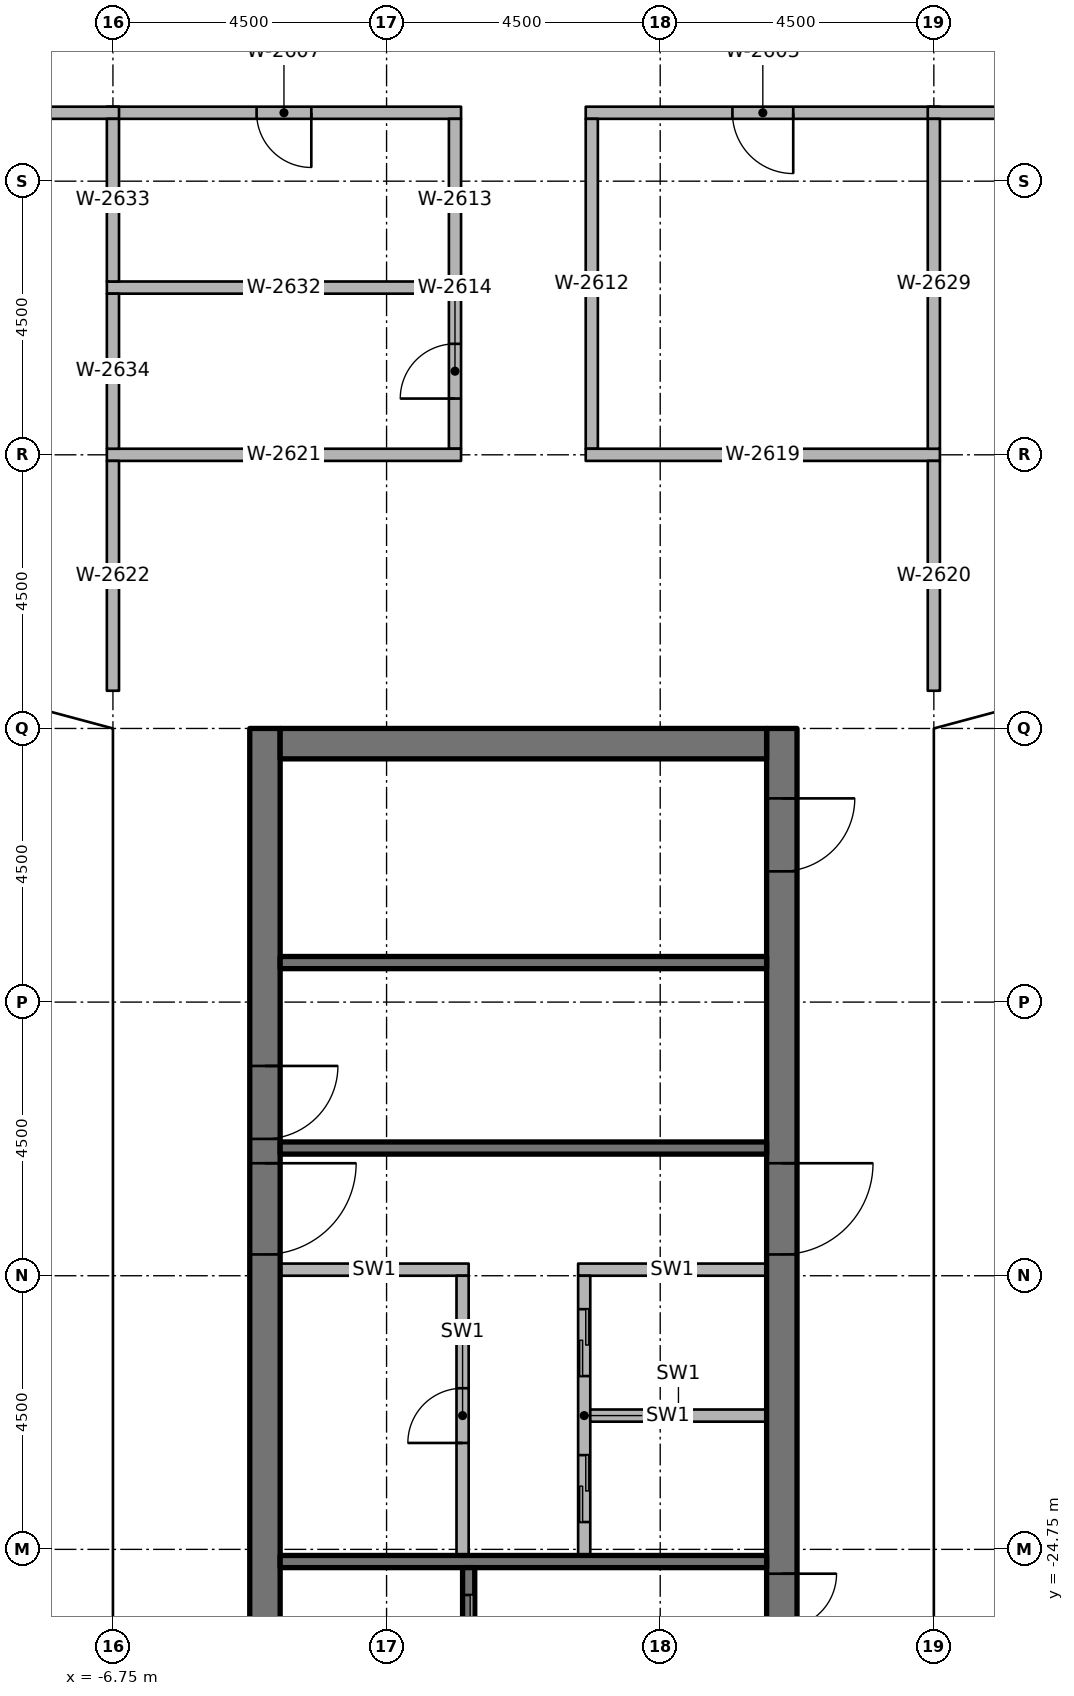
"""IFC4 building model, lengths in metres.
Left out: names, types, materials, properties, quantities, classifications, styles, units other than length and angle.
Written with IfcOpenShell. Run it as: python <this file> out.ifc"""

import sys

from ifc_helpers import new_model, si_unit, direction, frame, frame_2d, origin, origin_2d, place, context, subcontext, project, spatial, rectangle, extrude, element, fill, save


model = new_model("IFC4")
c1 = context("Model", 3, precision=1e-05, world=origin(), true_north=direction((0.0, 1.0)))
c2 = subcontext(c1, "Body", "Model", "MODEL_VIEW")
j1 = project(units=[si_unit("LENGTHUNIT", "METRE"), si_unit("PLANEANGLEUNIT", "RADIAN")], contexts=[c1])
p1 = place(None, origin())
s1 = spatial("IfcSite", under=j1, at=p1, CompositionType="ELEMENT")
p2 = place(p1, origin())
s2 = spatial("IfcBuilding", under=s1, at=p2, CompositionType="ELEMENT")
p3 = place(p2, frame((0.0, 0.0, 249.8)))
s3 = spatial("IfcBuildingStorey", under=s2, at=p3, CompositionType="ELEMENT", Elevation=249.8)
for number, where, z_axis, x_axis in (
    (1, (-6.25, -24.65, 0.0), (0.0, 0.0, 1.0), (1.0, 0.0, 0.0)),
    (2, (-6.25, -20.25, 0.0), (0.0, 0.0, 1.0), (1.0, 0.0, 0.0)),
    (3, (-6.25, -15.75, 0.0), (0.0, 0.0, 1.0), (1.0, 0.0, 0.0)),
    (4, (-6.25, -10.75, 0.0), (0.0, 0.0, 1.0), (1.0, 0.0, 0.0)),
    (5, (-6.25, -6.25, 0.0), (0.0, 0.0, 1.0), (1.0, 0.0, 0.0)),
    (6, (6.25, -24.65, 0.0), (0.0, 0.0, 1.0), (1.0, 0.0, 0.0)),
    (7, (6.25, -20.25, 0.0), (0.0, 0.0, 1.0), (1.0, 0.0, 0.0)),
    (8, (6.25, -15.75, 0.0), (0.0, 0.0, 1.0), (1.0, 0.0, 0.0)),
    (9, (6.25, -10.75, 0.0), (0.0, 0.0, 1.0), (1.0, 0.0, 0.0)),
    (10, (6.25, -6.25, 0.0), (0.0, 0.0, 1.0), (1.0, 0.0, 0.0)),
):
    element("IfcColumn", number, at=place(p3, frame(where, z_axis=z_axis, x_axis=x_axis)), inside=s3, PredefinedType="COLUMN", context=c2, shape_type="SweptSolid", body=[
        extrude(rectangle(XDim=0.6, YDim=0.6, at=origin_2d()), origin(), (0.0, 0.0, 1.0), 3.65),
    ])
p4 = place(p3, frame((-4.25, -11.25, 0.0), z_axis=(0.0, 0.0, 1.0), x_axis=(0.0, -1.0, 0.0)))
e11 = element("IfcWall", 11, at=p4, inside=s3, PredefinedType="SHEAR", context=c2, shape_type="SweptSolid", body=[
    extrude(rectangle(XDim=15.0, YDim=0.5, at=frame_2d((7.5, 0.0))), origin(), (0.0, 0.0, 1.0), 3.8),
])
p5 = place(p4, frame((7.15, 0.0, 0.0)))
e12 = element("IfcOpeningElement", 12, at=p5, cuts=e11, PredefinedType="OPENING", context=c2, shape_type="SweptSolid", body=[
    extrude(rectangle(XDim=1.5, YDim=2.3, at=frame_2d((0.75, 1.15))), frame((0.0, 0.26, 0.0), z_axis=(0.0, -1.0, 0.0), x_axis=(1.0, 0.0, 0.0)), (0.0, 0.0, 1.0), 0.52),
])
p6 = place(p4, frame((5.55, 0.0, 0.0)))
e13 = element("IfcOpeningElement", 13, at=p6, cuts=e11, PredefinedType="OPENING", context=c2, shape_type="SweptSolid", body=[
    extrude(rectangle(XDim=1.2, YDim=2.1, at=frame_2d((0.6, 1.05))), frame((0.0, 0.26, 0.0), z_axis=(0.0, -1.0, 0.0), x_axis=(1.0, 0.0, 0.0)), (0.0, 0.0, 1.0), 0.52),
])
p7 = place(p3, frame((4.25, -11.25, 0.0), z_axis=(0.0, 0.0, 1.0), x_axis=(0.0, -1.0, 0.0)))
e14 = element("IfcWall", 14, at=p7, inside=s3, PredefinedType="SHEAR", context=c2, shape_type="SweptSolid", body=[
    extrude(rectangle(XDim=15.0, YDim=0.5, at=frame_2d((7.5, 0.0))), origin(), (0.0, 0.0, 1.0), 3.8),
])
p8 = place(p7, frame((7.15, 0.0, 0.0)))
e15 = element("IfcOpeningElement", 15, at=p8, cuts=e14, PredefinedType="OPENING", context=c2, shape_type="SweptSolid", body=[
    extrude(rectangle(XDim=1.5, YDim=2.3, at=frame_2d((0.75, 1.15))), frame((0.0, 0.26, 0.0), z_axis=(0.0, -1.0, 0.0), x_axis=(1.0, 0.0, 0.0)), (0.0, 0.0, 1.0), 0.52),
])
p9 = place(p7, frame((13.9, 0.0, 0.0)))
e16 = element("IfcOpeningElement", 16, at=p9, cuts=e14, PredefinedType="OPENING", context=c2, shape_type="SweptSolid", body=[
    extrude(rectangle(XDim=0.9, YDim=2.1, at=frame_2d((0.45, 1.05))), frame((0.0, 0.26, 0.0), z_axis=(0.0, -1.0, 0.0), x_axis=(1.0, 0.0, 0.0)), (0.0, 0.0, 1.0), 0.52),
])
p10 = place(p7, frame((1.15, 0.0, 0.0)))
e17 = element("IfcOpeningElement", 17, at=p10, cuts=e14, PredefinedType="OPENING", context=c2, shape_type="SweptSolid", body=[
    extrude(rectangle(XDim=1.2, YDim=2.1, at=frame_2d((0.6, 1.05))), frame((0.0, 0.26, 0.0), z_axis=(0.0, -1.0, 0.0), x_axis=(1.0, 0.0, 0.0)), (0.0, 0.0, 1.0), 0.52),
])
p11 = place(p3, frame((-4.0, -11.5, 0.0), z_axis=(0.0, 0.0, 1.0), x_axis=(1.0, 0.0, 0.0)))
e18 = element("IfcWall", 18, at=p11, inside=s3, PredefinedType="SHEAR", context=c2, shape_type="SweptSolid", body=[
    extrude(rectangle(XDim=8.0, YDim=0.5, at=frame_2d((4.0, 0.0))), origin(), (0.0, 0.0, 1.0), 3.8),
])
p12 = place(p3, frame((4.0, -24.95, 0.0), z_axis=(0.0, 0.0, 1.0), x_axis=(-1.0, 0.0, 0.0)))
e19 = element("IfcWall", 19, at=p12, inside=s3, PredefinedType="SHEAR", context=c2, shape_type="SweptSolid", body=[
    extrude(rectangle(XDim=8.0, YDim=0.2, at=frame_2d((4.0, 0.0))), origin(), (0.0, 0.0, 1.0), 3.65),
])
p13 = place(p3, frame((-0.9, -27.3, 0.0), z_axis=(0.0, 0.0, 1.0), x_axis=(0.0, 1.0, 0.0)))
e20 = element("IfcWall", 20, at=p13, inside=s3, PredefinedType="SHEAR", context=c2, shape_type="SweptSolid", body=[
    extrude(rectangle(XDim=2.25, YDim=0.2, at=frame_2d((1.125, 0.0))), origin(), (0.0, 0.0, 1.0), 3.65),
])
p14 = place(p13, frame((0.7, 0.0, 0.0)))
e21 = element("IfcOpeningElement", 21, at=p14, cuts=e20, PredefinedType="OPENING", context=c2, shape_type="SweptSolid", body=[
    extrude(rectangle(XDim=1.1, YDim=2.3, at=frame_2d((0.55, 1.15))), frame((0.0, 0.11, 0.0), z_axis=(0.0, -1.0, 0.0), x_axis=(1.0, 0.0, 0.0)), (0.0, 0.0, 1.0), 0.22),
])
for number, where, z_axis, x_axis in (
    (22, (4.0, -18.15, 0.0), (0.0, 0.0, 1.0), (-1.0, 0.0, 0.0)),
    (23, (4.0, -15.1, 0.0), (0.0, 0.0, 1.0), (-1.0, 0.0, 0.0)),
):
    element("IfcWall", number, at=place(p3, frame(where, z_axis=z_axis, x_axis=x_axis)), inside=s3, PredefinedType="SHEAR", context=c2, shape_type="SweptSolid", body=[
        extrude(rectangle(XDim=8.0, YDim=0.2, at=frame_2d((4.0, 0.0))), origin(), (0.0, 0.0, 1.0), 3.65),
    ])
p15 = place(p3, frame((4.0, -20.15, 0.0), z_axis=(0.0, 0.0, 1.0), x_axis=(-1.0, 0.0, 0.0)))
e24 = element("IfcWall", 24, at=p15, inside=s3, PredefinedType="PARTITIONING", context=c2, shape_type="SweptSolid", body=[
    extrude(rectangle(XDim=3.1, YDim=0.2, at=frame_2d((1.55, 0.0))), origin(), (0.0, 0.0, 1.0), 3.65),
])
p16 = place(p3, frame((1.0, -24.85, 0.0), z_axis=(0.0, 0.0, 1.0), x_axis=(0.0, 1.0, 0.0)))
e25 = element("IfcWall", 25, at=p16, inside=s3, PredefinedType="PARTITIONING", context=c2, shape_type="SweptSolid", body=[
    extrude(rectangle(XDim=4.6, YDim=0.2, at=frame_2d((2.3, 0.0))), origin(), (0.0, 0.0, 1.0), 3.65),
])
p17 = place(p16, frame((0.55, 0.0, 0.0)))
e26 = element("IfcOpeningElement", 26, at=p17, cuts=e25, PredefinedType="OPENING", context=c2, shape_type="SweptSolid", body=[
    extrude(rectangle(XDim=1.1, YDim=2.3, at=frame_2d((0.55, 1.15))), frame((0.0, 0.11, 0.0), z_axis=(0.0, -1.0, 0.0), x_axis=(1.0, 0.0, 0.0)), (0.0, 0.0, 1.0), 0.22),
])
p18 = place(p16, frame((2.95, 0.0, 0.0)))
e27 = element("IfcOpeningElement", 27, at=p18, cuts=e25, PredefinedType="OPENING", context=c2, shape_type="SweptSolid", body=[
    extrude(rectangle(XDim=1.1, YDim=2.3, at=frame_2d((0.55, 1.15))), frame((0.0, 0.11, 0.0), z_axis=(0.0, -1.0, 0.0), x_axis=(1.0, 0.0, 0.0)), (0.0, 0.0, 1.0), 0.22),
])
p19 = place(p3, frame((-0.9, -20.15, 0.0), z_axis=(0.0, 0.0, 1.0), x_axis=(-1.0, 0.0, 0.0)))
e28 = element("IfcWall", 28, at=p19, inside=s3, PredefinedType="PARTITIONING", context=c2, shape_type="SweptSolid", body=[
    extrude(rectangle(XDim=3.1, YDim=0.2, at=frame_2d((1.55, 0.0))), origin(), (0.0, 0.0, 1.0), 3.65),
])
p20 = place(p3, frame((-1.0, -24.85, 0.0), z_axis=(0.0, 0.0, 1.0), x_axis=(0.0, 1.0, 0.0)))
e29 = element("IfcWall", 29, at=p20, inside=s3, PredefinedType="PARTITIONING", context=c2, shape_type="SweptSolid", body=[
    extrude(rectangle(XDim=4.6, YDim=0.2, at=frame_2d((2.3, 0.0))), origin(), (0.0, 0.0, 1.0), 3.65),
])
p21 = place(p20, frame((1.85, 0.0, 0.0)))
e30 = element("IfcOpeningElement", 30, at=p21, cuts=e29, PredefinedType="OPENING", context=c2, shape_type="SweptSolid", body=[
    extrude(rectangle(XDim=0.9, YDim=2.1, at=frame_2d((0.45, 1.05))), frame((0.0, 0.11, 0.0), z_axis=(0.0, -1.0, 0.0), x_axis=(1.0, 0.0, 0.0)), (0.0, 0.0, 1.0), 0.22),
])
p22 = place(p3, frame((4.0, -22.55, 0.0), z_axis=(0.0, 0.0, 1.0), x_axis=(-1.0, 0.0, 0.0)))
e31 = element("IfcWall", 31, at=p22, inside=s3, PredefinedType="PARTITIONING", context=c2, shape_type="SweptSolid", body=[
    extrude(rectangle(XDim=2.9, YDim=0.2, at=frame_2d((1.45, 0.0))), origin(), (0.0, 0.0, 1.0), 3.65),
])
p23 = place(p3, frame((6.85, -1.125, 0.0), z_axis=(0.0, 0.0, 1.0), x_axis=(-1.0, 0.0, 0.0)))
e32 = element("IfcWall", 32, at=p23, inside=s3, PredefinedType="PARTITIONING", context=c2, shape_type="SweptSolid", body=[
    extrude(rectangle(XDim=5.825, YDim=0.2, at=frame_2d((2.913, 0.0))), origin(), (0.0, 0.0, 1.0), 2.75),
])
p24 = place(p23, frame((2.413, 0.0, 0.0)))
e33 = element("IfcOpeningElement", 33, at=p24, cuts=e32, PredefinedType="OPENING", context=c2, shape_type="SweptSolid", body=[
    extrude(rectangle(XDim=1.0, YDim=2.1, at=frame_2d((0.5, 1.05))), frame((0.0, 0.11, 0.0), z_axis=(0.0, -1.0, 0.0), x_axis=(1.0, 0.0, 0.0)), (0.0, 0.0, 1.0), 0.22),
])
p25 = place(p3, frame((11.35, -1.125, 0.0), z_axis=(0.0, 0.0, 1.0), x_axis=(-1.0, 0.0, 0.0)))
e34 = element("IfcWall", 34, at=p25, inside=s3, PredefinedType="PARTITIONING", context=c2, shape_type="SweptSolid", body=[
    extrude(rectangle(XDim=4.7, YDim=0.2, at=frame_2d((2.35, 0.0))), origin(), (0.0, 0.0, 1.0), 2.75),
])
p26 = place(p25, frame((1.85, 0.0, 0.0)))
e35 = element("IfcOpeningElement", 35, at=p26, cuts=e34, PredefinedType="OPENING", context=c2, shape_type="SweptSolid", body=[
    extrude(rectangle(XDim=1.0, YDim=2.1, at=frame_2d((0.5, 1.05))), frame((0.0, 0.11, 0.0), z_axis=(0.0, -1.0, 0.0), x_axis=(1.0, 0.0, 0.0)), (0.0, 0.0, 1.0), 0.22),
])
p27 = place(p3, frame((-1.025, -1.125, 0.0), z_axis=(0.0, 0.0, 1.0), x_axis=(-1.0, 0.0, 0.0)))
e36 = element("IfcWall", 36, at=p27, inside=s3, PredefinedType="PARTITIONING", context=c2, shape_type="SweptSolid", body=[
    extrude(rectangle(XDim=5.825, YDim=0.2, at=frame_2d((2.913, 0.0))), origin(), (0.0, 0.0, 1.0), 2.75),
])
p28 = place(p27, frame((2.462, 0.0, 0.0)))
e37 = element("IfcOpeningElement", 37, at=p28, cuts=e36, PredefinedType="OPENING", context=c2, shape_type="SweptSolid", body=[
    extrude(rectangle(XDim=0.9, YDim=2.1, at=frame_2d((0.45, 1.05))), frame((0.0, 0.11, 0.0), z_axis=(0.0, -1.0, 0.0), x_axis=(1.0, 0.0, 0.0)), (0.0, 0.0, 1.0), 0.22),
])
p29 = place(p3, frame((-6.65, -1.125, 0.0), z_axis=(0.0, 0.0, 1.0), x_axis=(-1.0, 0.0, 0.0)))
e38 = element("IfcWall", 38, at=p29, inside=s3, PredefinedType="PARTITIONING", context=c2, shape_type="SweptSolid", body=[
    extrude(rectangle(XDim=4.7, YDim=0.2, at=frame_2d((2.35, 0.0))), origin(), (0.0, 0.0, 1.0), 2.75),
])
p30 = place(p29, frame((1.85, 0.0, 0.0)))
e39 = element("IfcOpeningElement", 39, at=p30, cuts=e38, PredefinedType="OPENING", context=c2, shape_type="SweptSolid", body=[
    extrude(rectangle(XDim=1.0, YDim=2.1, at=frame_2d((0.5, 1.05))), frame((0.0, 0.11, 0.0), z_axis=(0.0, -1.0, 0.0), x_axis=(1.0, 0.0, 0.0)), (0.0, 0.0, 1.0), 0.22),
])
p31 = place(p3, frame((1.125, -6.65, 0.0), z_axis=(0.0, 0.0, 1.0), x_axis=(0.0, 1.0, 0.0)))
e40 = element("IfcWall", 40, at=p31, inside=s3, PredefinedType="PARTITIONING", context=c2, shape_type="SweptSolid", body=[
    extrude(rectangle(XDim=5.425, YDim=0.2, at=frame_2d((2.712, 0.0))), origin(), (0.0, 0.0, 1.0), 2.75),
])
p32 = place(p3, frame((-1.125, -3.9, 0.0), z_axis=(0.0, 0.0, 1.0), x_axis=(0.0, 1.0, 0.0)))
e41 = element("IfcWall", 41, at=p32, inside=s3, PredefinedType="PARTITIONING", context=c2, shape_type="SweptSolid", body=[
    extrude(rectangle(XDim=2.675, YDim=0.2, at=frame_2d((1.337, 0.0))), origin(), (0.0, 0.0, 1.0), 2.75),
])
p33 = place(p3, frame((-1.125, -6.65, 0.0), z_axis=(0.0, 0.0, 1.0), x_axis=(0.0, 1.0, 0.0)))
e42 = element("IfcWall", 42, at=p33, inside=s3, PredefinedType="PARTITIONING", context=c2, shape_type="SweptSolid", body=[
    extrude(rectangle(XDim=2.55, YDim=0.2, at=frame_2d((1.275, 0.0))), origin(), (0.0, 0.0, 1.0), 2.75),
])
p34 = place(p33, frame((0.825, 0.0, 0.0)))
e43 = element("IfcOpeningElement", 43, at=p34, cuts=e42, PredefinedType="OPENING", context=c2, shape_type="SweptSolid", body=[
    extrude(rectangle(XDim=0.9, YDim=2.1, at=frame_2d((0.45, 1.05))), frame((0.0, 0.11, 0.0), z_axis=(0.0, -1.0, 0.0), x_axis=(1.0, 0.0, 0.0)), (0.0, 0.0, 1.0), 0.22),
])
p35 = place(p3, frame((1.025, -6.75, 0.0), z_axis=(0.0, 0.0, 1.0), x_axis=(1.0, 0.0, 0.0)))
e44 = element("IfcWall", 44, at=p35, inside=s3, PredefinedType="PARTITIONING", context=c2, shape_type="SweptSolid", body=[
    extrude(rectangle(XDim=5.825, YDim=0.2, at=frame_2d((2.913, 0.0))), origin(), (0.0, 0.0, 1.0), 2.75),
])
p36 = place(p3, frame((6.75, -10.63, 0.0), z_axis=(0.0, 0.0, 1.0), x_axis=(0.0, 1.0, 0.0)))
e45 = element("IfcWall", 45, at=p36, inside=s3, PredefinedType="PARTITIONING", context=c2, shape_type="SweptSolid", body=[
    extrude(rectangle(XDim=3.78, YDim=0.2, at=frame_2d((1.89, 0.0))), origin(), (0.0, 0.0, 1.0), 2.75),
])
p37 = place(p3, frame((-6.85, -6.75, 0.0), z_axis=(0.0, 0.0, 1.0), x_axis=(1.0, 0.0, 0.0)))
e46 = element("IfcWall", 46, at=p37, inside=s3, PredefinedType="PARTITIONING", context=c2, shape_type="SweptSolid", body=[
    extrude(rectangle(XDim=5.825, YDim=0.2, at=frame_2d((2.913, 0.0))), origin(), (0.0, 0.0, 1.0), 2.75),
])
p38 = place(p3, frame((-6.75, -10.63, 0.0), z_axis=(0.0, 0.0, 1.0), x_axis=(0.0, 1.0, 0.0)))
e47 = element("IfcWall", 47, at=p38, inside=s3, PredefinedType="PARTITIONING", context=c2, shape_type="SweptSolid", body=[
    extrude(rectangle(XDim=3.78, YDim=0.2, at=frame_2d((1.89, 0.0))), origin(), (0.0, 0.0, 1.0), 2.75),
])
p39 = place(p3, frame((6.75, -6.65, 0.0), z_axis=(0.0, 0.0, 1.0), x_axis=(0.0, 1.0, 0.0)))
e48 = element("IfcWall", 48, at=p39, inside=s3, PredefinedType="PARTITIONING", context=c2, shape_type="SweptSolid", body=[
    extrude(rectangle(XDim=5.425, YDim=0.2, at=frame_2d((2.712, 0.0))), origin(), (0.0, 0.0, 1.0), 2.75),
])
p40 = place(p3, frame((-6.85, -4.0, 0.0), z_axis=(0.0, 0.0, 1.0), x_axis=(1.0, 0.0, 0.0)))
e49 = element("IfcWall", 49, at=p40, inside=s3, PredefinedType="PARTITIONING", context=c2, shape_type="SweptSolid", body=[
    extrude(rectangle(XDim=5.825, YDim=0.2, at=frame_2d((2.913, 0.0))), origin(), (0.0, 0.0, 1.0), 2.75),
])
p41 = place(p3, frame((-6.75, -3.9, 0.0), z_axis=(0.0, 0.0, 1.0), x_axis=(0.0, 1.0, 0.0)))
e50 = element("IfcWall", 50, at=p41, inside=s3, PredefinedType="PARTITIONING", context=c2, shape_type="SweptSolid", body=[
    extrude(rectangle(XDim=2.675, YDim=0.2, at=frame_2d((1.337, 0.0))), origin(), (0.0, 0.0, 1.0), 2.75),
])
p42 = place(p3, frame((-6.75, -6.65, 0.0), z_axis=(0.0, 0.0, 1.0), x_axis=(0.0, 1.0, 0.0)))
e51 = element("IfcWall", 51, at=p42, inside=s3, PredefinedType="PARTITIONING", context=c2, shape_type="SweptSolid", body=[
    extrude(rectangle(XDim=2.55, YDim=0.2, at=frame_2d((1.275, 0.0))), origin(), (0.0, 0.0, 1.0), 2.75),
])
p43 = place(p8, origin())
e52 = element("IfcDoor", 52, at=p43, inside=s3, OperationType="DOUBLE_DOOR_SINGLE_SWING", PredefinedType="DOOR", context=c2, shape_type="SweptSolid", body=[
    extrude(rectangle(XDim=1.5, YDim=2.3, at=frame_2d((0.75, 1.15))), frame((0.0, 0.025, 0.0), z_axis=(0.0, -1.0, 0.0), x_axis=(1.0, 0.0, 0.0)), (0.0, 0.0, 1.0), 0.05),
])
fill(e15, e52)
p44 = place(p5, origin())
e53 = element("IfcDoor", 53, at=p44, inside=s3, OperationType="DOUBLE_DOOR_SINGLE_SWING", PredefinedType="DOOR", context=c2, shape_type="SweptSolid", body=[
    extrude(rectangle(XDim=1.5, YDim=2.3, at=frame_2d((0.75, 1.15))), frame((0.0, 0.025, 0.0), z_axis=(0.0, -1.0, 0.0), x_axis=(1.0, 0.0, 0.0)), (0.0, 0.0, 1.0), 0.05),
])
fill(e12, e53)
p45 = place(p9, origin())
e54 = element("IfcDoor", 54, at=p45, inside=s3, OperationType="SINGLE_SWING_LEFT", PredefinedType="DOOR", context=c2, shape_type="SweptSolid", body=[
    extrude(rectangle(XDim=0.9, YDim=2.1, at=frame_2d((0.45, 1.05))), frame((0.0, 0.025, 0.0), z_axis=(0.0, -1.0, 0.0), x_axis=(1.0, 0.0, 0.0)), (0.0, 0.0, 1.0), 0.05),
])
fill(e16, e54)
p46 = place(p6, origin())
e55 = element("IfcDoor", 55, at=p46, inside=s3, OperationType="SINGLE_SWING_LEFT", PredefinedType="DOOR", context=c2, shape_type="SweptSolid", body=[
    extrude(rectangle(XDim=1.2, YDim=2.1, at=frame_2d((0.6, 1.05))), frame((0.0, 0.025, 0.0), z_axis=(0.0, -1.0, 0.0), x_axis=(1.0, 0.0, 0.0)), (0.0, 0.0, 1.0), 0.05),
])
fill(e13, e55)
p47 = place(p10, origin())
e56 = element("IfcDoor", 56, at=p47, inside=s3, OperationType="SINGLE_SWING_RIGHT", PredefinedType="DOOR", context=c2, shape_type="SweptSolid", body=[
    extrude(rectangle(XDim=1.2, YDim=2.1, at=frame_2d((0.6, 1.05))), frame((0.0, 0.025, 0.0), z_axis=(0.0, -1.0, 0.0), x_axis=(1.0, 0.0, 0.0)), (0.0, 0.0, 1.0), 0.05),
])
fill(e17, e56)
p48 = place(p14, origin())
e57 = element("IfcDoor", 57, at=p48, inside=s3, OperationType="DOUBLE_DOOR_SLIDING", PredefinedType="DOOR", context=c2, shape_type="SweptSolid", body=[
    extrude(rectangle(XDim=1.1, YDim=2.3, at=frame_2d((0.55, 1.15))), frame((0.0, 0.025, 0.0), z_axis=(0.0, -1.0, 0.0), x_axis=(1.0, 0.0, 0.0)), (0.0, 0.0, 1.0), 0.05),
])
fill(e21, e57)
p49 = place(p17, origin())
e58 = element("IfcDoor", 58, at=p49, inside=s3, OperationType="DOUBLE_DOOR_SLIDING", PredefinedType="DOOR", context=c2, shape_type="SweptSolid", body=[
    extrude(rectangle(XDim=1.1, YDim=2.3, at=frame_2d((0.55, 1.15))), frame((0.0, 0.025, 0.0), z_axis=(0.0, -1.0, 0.0), x_axis=(1.0, 0.0, 0.0)), (0.0, 0.0, 1.0), 0.05),
])
fill(e26, e58)
p50 = place(p18, origin())
e59 = element("IfcDoor", 59, at=p50, inside=s3, OperationType="DOUBLE_DOOR_SLIDING", PredefinedType="DOOR", context=c2, shape_type="SweptSolid", body=[
    extrude(rectangle(XDim=1.1, YDim=2.3, at=frame_2d((0.55, 1.15))), frame((0.0, 0.025, 0.0), z_axis=(0.0, -1.0, 0.0), x_axis=(1.0, 0.0, 0.0)), (0.0, 0.0, 1.0), 0.05),
])
fill(e27, e59)
p51 = place(p21, origin())
e60 = element("IfcDoor", 60, at=p51, inside=s3, OperationType="SINGLE_SWING_LEFT", PredefinedType="DOOR", context=c2, shape_type="SweptSolid", body=[
    extrude(rectangle(XDim=0.9, YDim=2.1, at=frame_2d((0.45, 1.05))), frame((0.0, 0.025, 0.0), z_axis=(0.0, -1.0, 0.0), x_axis=(1.0, 0.0, 0.0)), (0.0, 0.0, 1.0), 0.05),
])
fill(e30, e60)
p52 = place(p24, origin())
e61 = element("IfcDoor", 61, at=p52, inside=s3, OperationType="SINGLE_SWING_RIGHT", PredefinedType="DOOR", context=c2, shape_type="SweptSolid", body=[
    extrude(rectangle(XDim=1.0, YDim=2.1, at=frame_2d((0.5, 1.05))), frame((0.0, 0.025, 0.0), z_axis=(0.0, -1.0, 0.0), x_axis=(1.0, 0.0, 0.0)), (0.0, 0.0, 1.0), 0.05),
])
fill(e33, e61)
p53 = place(p28, origin())
e62 = element("IfcDoor", 62, at=p53, inside=s3, OperationType="SINGLE_SWING_RIGHT", PredefinedType="DOOR", context=c2, shape_type="SweptSolid", body=[
    extrude(rectangle(XDim=0.9, YDim=2.1, at=frame_2d((0.45, 1.05))), frame((0.0, 0.025, 0.0), z_axis=(0.0, -1.0, 0.0), x_axis=(1.0, 0.0, 0.0)), (0.0, 0.0, 1.0), 0.05),
])
fill(e37, e62)
p54 = place(p34, origin())
e63 = element("IfcDoor", 63, at=p54, inside=s3, OperationType="SINGLE_SWING_RIGHT", PredefinedType="DOOR", context=c2, shape_type="SweptSolid", body=[
    extrude(rectangle(XDim=0.9, YDim=2.1, at=frame_2d((0.45, 1.05))), frame((0.0, 0.025, 0.0), z_axis=(0.0, -1.0, 0.0), x_axis=(1.0, 0.0, 0.0)), (0.0, 0.0, 1.0), 0.05),
])
fill(e43, e63)
save(model, sys.argv[1])
